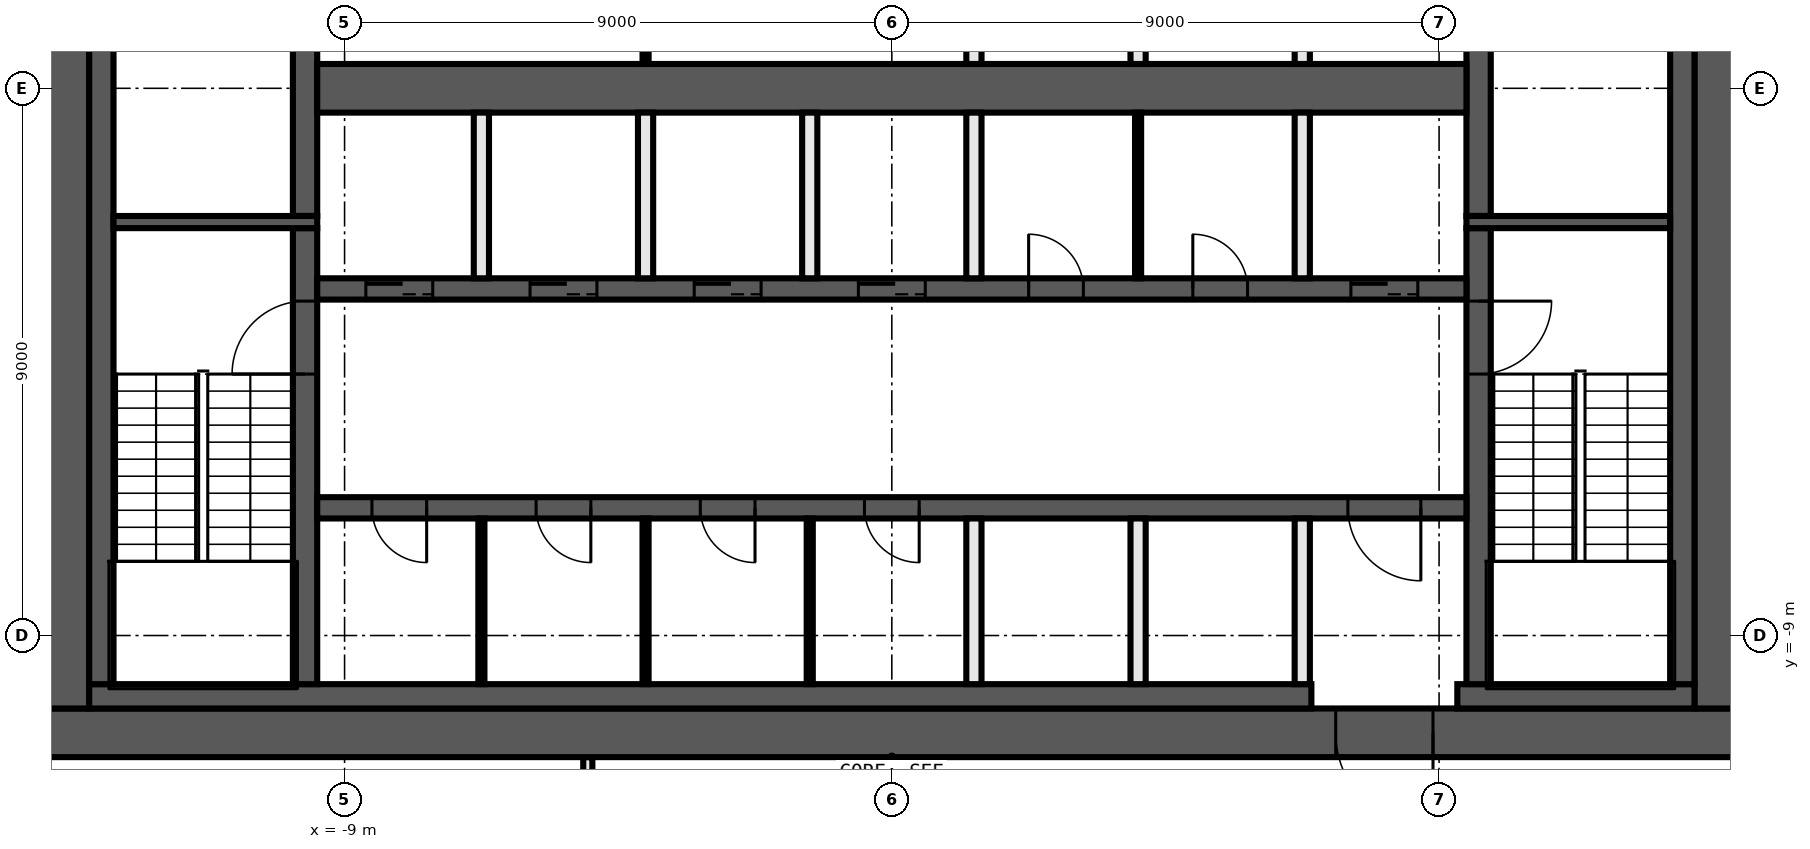
"""IFC4 building model, lengths in metres.
Left out: names, types, materials, properties, quantities, classifications, styles, units other than length and angle.
Written with IfcOpenShell. Run it as: python <this file> out.ifc"""

import sys

from ifc_helpers import new_model, si_unit, direction, frame, frame_2d, origin, place, context, subcontext, project, spatial, rectangle, extrude, element, fill, save


model = new_model("IFC4")
c1 = context("Model", 3, precision=1e-05, world=origin(), true_north=direction((0.0, 1.0)))
c2 = subcontext(c1, "Body", "Model", "MODEL_VIEW")
j1 = project(units=[si_unit("LENGTHUNIT", "METRE"), si_unit("PLANEANGLEUNIT", "RADIAN")], contexts=[c1])
p1 = place(None, origin())
s1 = spatial("IfcSite", under=j1, at=p1, CompositionType="ELEMENT")
p2 = place(p1, origin())
s2 = spatial("IfcBuilding", under=s1, at=p2, CompositionType="ELEMENT")
p3 = place(p2, frame((0.0, 0.0, 198.8)))
s3 = spatial("IfcBuildingStorey", under=s2, at=p3, CompositionType="ELEMENT", Elevation=198.8)
p4 = place(p3, frame((-5.0, -14.125, 0.0), z_axis=(0.0, 0.0, 1.0), x_axis=(0.0, 1.0, 0.0)))
e1 = element("IfcWall", 1, at=p4, inside=s3, PredefinedType="PARTITIONING", context=c2, shape_type="SweptSolid", body=[
    extrude(rectangle(XDim=3.125, YDim=0.15, at=frame_2d((1.562, 0.0))), origin(), (0.0, 0.0, 1.0), 3.82),
])
p5 = place(p3, frame((14.0, -10.6, 0.0), z_axis=(0.0, 0.0, 1.0), x_axis=(-1.0, 0.0, 0.0)))
e2 = element("IfcWall", 2, at=p5, inside=s3, PredefinedType="SHEAR", context=c2, shape_type="SweptSolid", body=[
    extrude(rectangle(XDim=28.0, YDim=0.8, at=frame_2d((14.0, 0.0))), origin(), (0.0, 0.0, 1.0), 3.82),
])
p6 = place(p5, frame((5.1, 0.0, 0.0)))
e3 = element("IfcOpeningElement", 3, at=p6, cuts=e2, PredefinedType="OPENING", context=c2, shape_type="SweptSolid", body=[
    extrude(rectangle(XDim=1.6, YDim=2.1, at=frame_2d((0.8, 1.05))), frame((0.0, 0.41, 0.0), z_axis=(0.0, -1.0, 0.0), x_axis=(1.0, 0.0, 0.0)), (0.0, 0.0, 1.0), 0.82),
])
for number, where, z_axis, x_axis in (
    (4, (13.6, 10.2, 0.0), (0.0, 0.0, 1.0), (0.0, -1.0, 0.0)),
    (5, (-13.6, -10.2, 0.0), (0.0, 0.0, 1.0), (0.0, 1.0, 0.0)),
):
    element("IfcWall", number, at=place(p3, frame(where, z_axis=z_axis, x_axis=x_axis)), inside=s3, PredefinedType="SHEAR", context=c2, shape_type="SweptSolid", body=[
        extrude(rectangle(XDim=20.4, YDim=0.8, at=frame_2d((10.2, 0.0))), origin(), (0.0, 0.0, 1.0), 3.82),
    ])
p7 = place(p3, frame((13.2, -10.0, 0.0), z_axis=(0.0, 0.0, 1.0), x_axis=(-1.0, 0.0, 0.0)))
e6 = element("IfcWall", 6, at=p7, inside=s3, PredefinedType="SHEAR", context=c2, shape_type="SweptSolid", body=[
    extrude(rectangle(XDim=3.9, YDim=0.4, at=frame_2d((1.95, 0.0))), origin(), (0.0, 0.0, 1.0), 3.82),
])
p8 = place(p3, frame((6.9, -10.0, 0.0), z_axis=(0.0, 0.0, 1.0), x_axis=(-1.0, 0.0, 0.0)))
e7 = element("IfcWall", 7, at=p8, inside=s3, PredefinedType="SHEAR", context=c2, shape_type="SweptSolid", body=[
    extrude(rectangle(XDim=20.1, YDim=0.4, at=frame_2d((10.05, 0.0))), origin(), (0.0, 0.0, 1.0), 3.82),
])
for number, where, z_axis, x_axis in (
    (8, (13.0, 9.8, 0.0), (0.0, 0.0, 1.0), (0.0, -1.0, 0.0)),
    (9, (-13.0, -9.8, 0.0), (0.0, 0.0, 1.0), (0.0, 1.0, 0.0)),
):
    element("IfcWall", number, at=place(p3, frame(where, z_axis=z_axis, x_axis=x_axis)), inside=s3, PredefinedType="SHEAR", context=c2, shape_type="SweptSolid", body=[
        extrude(rectangle(XDim=19.6, YDim=0.4, at=frame_2d((9.8, 0.0))), origin(), (0.0, 0.0, 1.0), 3.82),
    ])
p9 = place(p3, frame((9.65, -2.3, 0.0), z_axis=(0.0, 0.0, 1.0), x_axis=(0.0, -1.0, 0.0)))
e10 = element("IfcWall", 10, at=p9, inside=s3, PredefinedType="SHEAR", context=c2, shape_type="SweptSolid", body=[
    extrude(rectangle(XDim=7.5, YDim=0.4, at=frame_2d((3.75, 0.0))), origin(), (0.0, 0.0, 1.0), 3.82),
])
p10 = place(p9, frame((1.2, 0.0, 0.0)))
e11 = element("IfcOpeningElement", 11, at=p10, cuts=e10, PredefinedType="OPENING", context=c2, shape_type="SweptSolid", body=[
    extrude(rectangle(XDim=1.2, YDim=2.1, at=frame_2d((0.6, 1.05))), frame((0.0, 0.21, 0.0), z_axis=(0.0, -1.0, 0.0), x_axis=(1.0, 0.0, 0.0)), (0.0, 0.0, 1.0), 0.42),
])
p11 = place(p3, frame((9.65, 2.1, 0.0), z_axis=(0.0, 0.0, 1.0), x_axis=(0.0, -1.0, 0.0)))
e12 = element("IfcWall", 12, at=p11, inside=s3, PredefinedType="SHEAR", context=c2, shape_type="SweptSolid", body=[
    extrude(rectangle(XDim=4.2, YDim=0.4, at=frame_2d((2.1, 0.0))), origin(), (0.0, 0.0, 1.0), 3.82),
])
p12 = place(p11, frame((0.15, 0.0, 0.0)))
e13 = element("IfcOpeningElement", 13, at=p12, cuts=e12, PredefinedType="OPENING", context=c2, shape_type="SweptSolid", body=[
    extrude(rectangle(XDim=0.9, YDim=2.1, at=frame_2d((0.45, 1.05))), frame((0.0, 0.21, 0.0), z_axis=(0.0, -1.0, 0.0), x_axis=(1.0, 0.0, 0.0)), (0.0, 0.0, 1.0), 0.42),
])
p13 = place(p3, frame((-9.65, -9.8, 0.0), z_axis=(0.0, 0.0, 1.0), x_axis=(0.0, 1.0, 0.0)))
e14 = element("IfcWall", 14, at=p13, inside=s3, PredefinedType="SHEAR", context=c2, shape_type="SweptSolid", body=[
    extrude(rectangle(XDim=7.5, YDim=0.4, at=frame_2d((3.75, 0.0))), origin(), (0.0, 0.0, 1.0), 3.82),
])
p14 = place(p13, frame((5.1, 0.0, 0.0)))
e15 = element("IfcOpeningElement", 15, at=p14, cuts=e14, PredefinedType="OPENING", context=c2, shape_type="SweptSolid", body=[
    extrude(rectangle(XDim=1.2, YDim=2.1, at=frame_2d((0.6, 1.05))), frame((0.0, 0.21, 0.0), z_axis=(0.0, -1.0, 0.0), x_axis=(1.0, 0.0, 0.0)), (0.0, 0.0, 1.0), 0.42),
])
p15 = place(p3, frame((-9.65, -2.1, 0.0), z_axis=(0.0, 0.0, 1.0), x_axis=(0.0, 1.0, 0.0)))
e16 = element("IfcWall", 16, at=p15, inside=s3, PredefinedType="SHEAR", context=c2, shape_type="SweptSolid", body=[
    extrude(rectangle(XDim=4.2, YDim=0.4, at=frame_2d((2.1, 0.0))), origin(), (0.0, 0.0, 1.0), 3.82),
])
for number, where, z_axis, x_axis in (
    (17, (9.45, -2.2, 0.0), (0.0, 0.0, 1.0), (1.0, 0.0, 0.0)),
    (18, (-9.45, -2.2, 0.0), (0.0, 0.0, 1.0), (-1.0, 0.0, 0.0)),
):
    element("IfcWall", number, at=place(p3, frame(where, z_axis=z_axis, x_axis=x_axis)), inside=s3, PredefinedType="SHEAR", context=c2, shape_type="SweptSolid", body=[
        extrude(rectangle(XDim=3.35, YDim=0.2, at=frame_2d((1.675, 0.0))), origin(), (0.0, 0.0, 1.0), 3.82),
    ])
p16 = place(p3, frame((-9.45, -3.3, 0.0), z_axis=(0.0, 0.0, 1.0), x_axis=(1.0, 0.0, 0.0)))
e19 = element("IfcWall", 19, at=p16, inside=s3, PredefinedType="SHEAR", context=c2, shape_type="SweptSolid", body=[
    extrude(rectangle(XDim=18.9, YDim=0.35, at=frame_2d((9.45, 0.0))), origin(), (0.0, 0.0, 1.0), 3.82),
])
p17 = place(p16, frame((0.8, 0.0, 0.0)))
e20 = element("IfcOpeningElement", 20, at=p17, cuts=e19, PredefinedType="OPENING", context=c2, shape_type="SweptSolid", body=[
    extrude(rectangle(XDim=1.1, YDim=2.1, at=frame_2d((0.55, 1.05))), frame((0.0, 0.185, 0.0), z_axis=(0.0, -1.0, 0.0), x_axis=(1.0, 0.0, 0.0)), (0.0, 0.0, 1.0), 0.37),
])
p18 = place(p16, frame((3.5, 0.0, 0.0)))
e21 = element("IfcOpeningElement", 21, at=p18, cuts=e19, PredefinedType="OPENING", context=c2, shape_type="SweptSolid", body=[
    extrude(rectangle(XDim=1.1, YDim=2.1, at=frame_2d((0.55, 1.05))), frame((0.0, 0.185, 0.0), z_axis=(0.0, -1.0, 0.0), x_axis=(1.0, 0.0, 0.0)), (0.0, 0.0, 1.0), 0.37),
])
p19 = place(p16, frame((6.2, 0.0, 0.0)))
e22 = element("IfcOpeningElement", 22, at=p19, cuts=e19, PredefinedType="OPENING", context=c2, shape_type="SweptSolid", body=[
    extrude(rectangle(XDim=1.1, YDim=2.1, at=frame_2d((0.55, 1.05))), frame((0.0, 0.185, 0.0), z_axis=(0.0, -1.0, 0.0), x_axis=(1.0, 0.0, 0.0)), (0.0, 0.0, 1.0), 0.37),
])
p20 = place(p16, frame((8.9, 0.0, 0.0)))
e23 = element("IfcOpeningElement", 23, at=p20, cuts=e19, PredefinedType="OPENING", context=c2, shape_type="SweptSolid", body=[
    extrude(rectangle(XDim=1.1, YDim=2.1, at=frame_2d((0.55, 1.05))), frame((0.0, 0.185, 0.0), z_axis=(0.0, -1.0, 0.0), x_axis=(1.0, 0.0, 0.0)), (0.0, 0.0, 1.0), 0.37),
])
p21 = place(p16, frame((17.0, 0.0, 0.0)))
e24 = element("IfcOpeningElement", 24, at=p21, cuts=e19, PredefinedType="OPENING", context=c2, shape_type="SweptSolid", body=[
    extrude(rectangle(XDim=1.1, YDim=2.1, at=frame_2d((0.55, 1.05))), frame((0.0, 0.185, 0.0), z_axis=(0.0, -1.0, 0.0), x_axis=(1.0, 0.0, 0.0)), (0.0, 0.0, 1.0), 0.37),
])
p22 = place(p16, frame((11.7, 0.0, 0.0)))
e25 = element("IfcOpeningElement", 25, at=p22, cuts=e19, PredefinedType="OPENING", context=c2, shape_type="SweptSolid", body=[
    extrude(rectangle(XDim=0.9, YDim=2.1, at=frame_2d((0.45, 1.05))), frame((0.0, 0.185, 0.0), z_axis=(0.0, -1.0, 0.0), x_axis=(1.0, 0.0, 0.0)), (0.0, 0.0, 1.0), 0.37),
])
p23 = place(p16, frame((14.4, 0.0, 0.0)))
e26 = element("IfcOpeningElement", 26, at=p23, cuts=e19, PredefinedType="OPENING", context=c2, shape_type="SweptSolid", body=[
    extrude(rectangle(XDim=0.9, YDim=2.1, at=frame_2d((0.45, 1.05))), frame((0.0, 0.185, 0.0), z_axis=(0.0, -1.0, 0.0), x_axis=(1.0, 0.0, 0.0)), (0.0, 0.0, 1.0), 0.37),
])
p24 = place(p3, frame((9.45, -6.9, 0.0), z_axis=(0.0, 0.0, 1.0), x_axis=(-1.0, 0.0, 0.0)))
e27 = element("IfcWall", 27, at=p24, inside=s3, PredefinedType="SHEAR", context=c2, shape_type="SweptSolid", body=[
    extrude(rectangle(XDim=18.9, YDim=0.35, at=frame_2d((9.45, 0.0))), origin(), (0.0, 0.0, 1.0), 3.82),
])
p25 = place(p24, frame((0.75, 0.0, 0.0)))
e28 = element("IfcOpeningElement", 28, at=p25, cuts=e27, PredefinedType="OPENING", context=c2, shape_type="SweptSolid", body=[
    extrude(rectangle(XDim=1.2, YDim=2.1, at=frame_2d((0.6, 1.05))), frame((0.0, 0.185, 0.0), z_axis=(0.0, -1.0, 0.0), x_axis=(1.0, 0.0, 0.0)), (0.0, 0.0, 1.0), 0.37),
])
p26 = place(p24, frame((17.1, 0.0, 0.0)))
e29 = element("IfcOpeningElement", 29, at=p26, cuts=e27, PredefinedType="OPENING", context=c2, shape_type="SweptSolid", body=[
    extrude(rectangle(XDim=0.9, YDim=2.1, at=frame_2d((0.45, 1.05))), frame((0.0, 0.185, 0.0), z_axis=(0.0, -1.0, 0.0), x_axis=(1.0, 0.0, 0.0)), (0.0, 0.0, 1.0), 0.37),
])
p27 = place(p24, frame((14.4, 0.0, 0.0)))
e30 = element("IfcOpeningElement", 30, at=p27, cuts=e27, PredefinedType="OPENING", context=c2, shape_type="SweptSolid", body=[
    extrude(rectangle(XDim=0.9, YDim=2.1, at=frame_2d((0.45, 1.05))), frame((0.0, 0.185, 0.0), z_axis=(0.0, -1.0, 0.0), x_axis=(1.0, 0.0, 0.0)), (0.0, 0.0, 1.0), 0.37),
])
p28 = place(p24, frame((11.7, 0.0, 0.0)))
e31 = element("IfcOpeningElement", 31, at=p28, cuts=e27, PredefinedType="OPENING", context=c2, shape_type="SweptSolid", body=[
    extrude(rectangle(XDim=0.9, YDim=2.1, at=frame_2d((0.45, 1.05))), frame((0.0, 0.185, 0.0), z_axis=(0.0, -1.0, 0.0), x_axis=(1.0, 0.0, 0.0)), (0.0, 0.0, 1.0), 0.37),
])
p29 = place(p24, frame((9.0, 0.0, 0.0)))
e32 = element("IfcOpeningElement", 32, at=p29, cuts=e27, PredefinedType="OPENING", context=c2, shape_type="SweptSolid", body=[
    extrude(rectangle(XDim=0.9, YDim=2.1, at=frame_2d((0.45, 1.05))), frame((0.0, 0.185, 0.0), z_axis=(0.0, -1.0, 0.0), x_axis=(1.0, 0.0, 0.0)), (0.0, 0.0, 1.0), 0.37),
])
p30 = place(p3, frame((-9.45, 0.0, 0.0), z_axis=(0.0, 0.0, 1.0), x_axis=(1.0, 0.0, 0.0)))
e33 = element("IfcWall", 33, at=p30, inside=s3, PredefinedType="SHEAR", context=c2, shape_type="SweptSolid", body=[
    extrude(rectangle(XDim=18.9, YDim=0.8, at=frame_2d((9.45, 0.0))), origin(), (0.0, 0.0, 1.0), 3.82),
])
for number, where, z_axis, x_axis in (
    (34, (6.75, -9.8, 0.0), (0.0, 0.0, 1.0), (0.0, 1.0, 0.0)),
    (35, (6.75, -3.125, 0.0), (0.0, 0.0, 1.0), (0.0, 1.0, 0.0)),
    (36, (6.75, 0.4, 0.0), (0.0, 0.0, 1.0), (0.0, 1.0, 0.0)),
):
    element("IfcWall", number, at=place(p3, frame(where, z_axis=z_axis, x_axis=x_axis)), inside=s3, PredefinedType="SOLIDWALL", context=c2, shape_type="SweptSolid", body=[
        extrude(rectangle(XDim=2.725, YDim=0.25, at=frame_2d((1.363, 0.0))), origin(), (0.0, 0.0, 1.0), 3.82),
    ])
p31 = place(p3, frame((4.05, -3.125, 0.0), z_axis=(0.0, 0.0, 1.0), x_axis=(0.0, 1.0, 0.0)))
e37 = element("IfcWall", 37, at=p31, inside=s3, PredefinedType="PARTITIONING", context=c2, shape_type="SweptSolid", body=[
    extrude(rectangle(XDim=2.725, YDim=0.1, at=frame_2d((1.363, 0.0))), origin(), (0.0, 0.0, 1.0), 3.82),
])
for number, where, z_axis, x_axis in (
    (38, (4.05, -9.8, 0.0), (0.0, 0.0, 1.0), (0.0, 1.0, 0.0)),
    (39, (4.05, 0.4, 0.0), (0.0, 0.0, 1.0), (0.0, 1.0, 0.0)),
    (40, (1.35, -9.8, 0.0), (0.0, 0.0, 1.0), (0.0, 1.0, 0.0)),
    (41, (1.35, -3.125, 0.0), (0.0, 0.0, 1.0), (0.0, 1.0, 0.0)),
    (42, (1.35, 0.4, 0.0), (0.0, 0.0, 1.0), (0.0, 1.0, 0.0)),
):
    element("IfcWall", number, at=place(p3, frame(where, z_axis=z_axis, x_axis=x_axis)), inside=s3, PredefinedType="SOLIDWALL", context=c2, shape_type="SweptSolid", body=[
        extrude(rectangle(XDim=2.725, YDim=0.25, at=frame_2d((1.363, 0.0))), origin(), (0.0, 0.0, 1.0), 3.82),
    ])
p32 = place(p3, frame((-1.35, -9.8, 0.0), z_axis=(0.0, 0.0, 1.0), x_axis=(0.0, 1.0, 0.0)))
e43 = element("IfcWall", 43, at=p32, inside=s3, PredefinedType="PARTITIONING", context=c2, shape_type="SweptSolid", body=[
    extrude(rectangle(XDim=2.725, YDim=0.1, at=frame_2d((1.363, 0.0))), origin(), (0.0, 0.0, 1.0), 3.82),
])
p33 = place(p3, frame((-1.35, -3.125, 0.0), z_axis=(0.0, 0.0, 1.0), x_axis=(0.0, 1.0, 0.0)))
e44 = element("IfcWall", 44, at=p33, inside=s3, PredefinedType="SOLIDWALL", context=c2, shape_type="SweptSolid", body=[
    extrude(rectangle(XDim=2.725, YDim=0.25, at=frame_2d((1.363, 0.0))), origin(), (0.0, 0.0, 1.0), 3.82),
])
for number, where, z_axis, x_axis in (
    (45, (-4.05, -9.8, 0.0), (0.0, 0.0, 1.0), (0.0, 1.0, 0.0)),
    (46, (-4.05, 0.4, 0.0), (0.0, 0.0, 1.0), (0.0, 1.0, 0.0)),
):
    element("IfcWall", number, at=place(p3, frame(where, z_axis=z_axis, x_axis=x_axis)), inside=s3, PredefinedType="PARTITIONING", context=c2, shape_type="SweptSolid", body=[
        extrude(rectangle(XDim=2.725, YDim=0.1, at=frame_2d((1.363, 0.0))), origin(), (0.0, 0.0, 1.0), 3.82),
    ])
p34 = place(p3, frame((-4.05, -3.125, 0.0), z_axis=(0.0, 0.0, 1.0), x_axis=(0.0, 1.0, 0.0)))
e47 = element("IfcWall", 47, at=p34, inside=s3, PredefinedType="SOLIDWALL", context=c2, shape_type="SweptSolid", body=[
    extrude(rectangle(XDim=2.725, YDim=0.25, at=frame_2d((1.363, 0.0))), origin(), (0.0, 0.0, 1.0), 3.82),
])
p35 = place(p3, frame((-6.75, -9.8, 0.0), z_axis=(0.0, 0.0, 1.0), x_axis=(0.0, 1.0, 0.0)))
e48 = element("IfcWall", 48, at=p35, inside=s3, PredefinedType="PARTITIONING", context=c2, shape_type="SweptSolid", body=[
    extrude(rectangle(XDim=2.725, YDim=0.1, at=frame_2d((1.363, 0.0))), origin(), (0.0, 0.0, 1.0), 3.82),
])
p36 = place(p3, frame((-6.75, -3.125, 0.0), z_axis=(0.0, 0.0, 1.0), x_axis=(0.0, 1.0, 0.0)))
e49 = element("IfcWall", 49, at=p36, inside=s3, PredefinedType="SOLIDWALL", context=c2, shape_type="SweptSolid", body=[
    extrude(rectangle(XDim=2.725, YDim=0.25, at=frame_2d((1.363, 0.0))), origin(), (0.0, 0.0, 1.0), 3.82),
])
p37 = place(p17, origin())
e50 = element("IfcDoor", 50, at=p37, inside=s3, OperationType="DOUBLE_DOOR_SLIDING", PredefinedType="DOOR", context=c2, shape_type="SweptSolid", body=[
    extrude(rectangle(XDim=1.1, YDim=2.1, at=frame_2d((0.55, 1.05))), frame((0.0, 0.025, 0.0), z_axis=(0.0, -1.0, 0.0), x_axis=(1.0, 0.0, 0.0)), (0.0, 0.0, 1.0), 0.05),
])
fill(e20, e50)
p38 = place(p18, origin())
e51 = element("IfcDoor", 51, at=p38, inside=s3, OperationType="DOUBLE_DOOR_SLIDING", PredefinedType="DOOR", context=c2, shape_type="SweptSolid", body=[
    extrude(rectangle(XDim=1.1, YDim=2.1, at=frame_2d((0.55, 1.05))), frame((0.0, 0.025, 0.0), z_axis=(0.0, -1.0, 0.0), x_axis=(1.0, 0.0, 0.0)), (0.0, 0.0, 1.0), 0.05),
])
fill(e21, e51)
p39 = place(p19, origin())
e52 = element("IfcDoor", 52, at=p39, inside=s3, OperationType="DOUBLE_DOOR_SLIDING", PredefinedType="DOOR", context=c2, shape_type="SweptSolid", body=[
    extrude(rectangle(XDim=1.1, YDim=2.1, at=frame_2d((0.55, 1.05))), frame((0.0, 0.025, 0.0), z_axis=(0.0, -1.0, 0.0), x_axis=(1.0, 0.0, 0.0)), (0.0, 0.0, 1.0), 0.05),
])
fill(e22, e52)
p40 = place(p20, origin())
e53 = element("IfcDoor", 53, at=p40, inside=s3, OperationType="DOUBLE_DOOR_SLIDING", PredefinedType="DOOR", context=c2, shape_type="SweptSolid", body=[
    extrude(rectangle(XDim=1.1, YDim=2.1, at=frame_2d((0.55, 1.05))), frame((0.0, 0.025, 0.0), z_axis=(0.0, -1.0, 0.0), x_axis=(1.0, 0.0, 0.0)), (0.0, 0.0, 1.0), 0.05),
])
fill(e23, e53)
p41 = place(p21, origin())
e54 = element("IfcDoor", 54, at=p41, inside=s3, OperationType="DOUBLE_DOOR_SLIDING", PredefinedType="DOOR", context=c2, shape_type="SweptSolid", body=[
    extrude(rectangle(XDim=1.1, YDim=2.1, at=frame_2d((0.55, 1.05))), frame((0.0, 0.025, 0.0), z_axis=(0.0, -1.0, 0.0), x_axis=(1.0, 0.0, 0.0)), (0.0, 0.0, 1.0), 0.05),
])
fill(e24, e54)
p42 = place(p6, origin())
e55 = element("IfcDoor", 55, at=p42, inside=s3, OperationType="DOUBLE_DOOR_SINGLE_SWING", PredefinedType="DOOR", context=c2, shape_type="SweptSolid", body=[
    extrude(rectangle(XDim=1.6, YDim=2.1, at=frame_2d((0.8, 1.05))), frame((0.0, 0.025, 0.0), z_axis=(0.0, -1.0, 0.0), x_axis=(1.0, 0.0, 0.0)), (0.0, 0.0, 1.0), 0.05),
])
fill(e3, e55)
p43 = place(p25, origin())
e56 = element("IfcDoor", 56, at=p43, inside=s3, OperationType="SINGLE_SWING_LEFT", PredefinedType="DOOR", context=c2, shape_type="SweptSolid", body=[
    extrude(rectangle(XDim=1.2, YDim=2.1, at=frame_2d((0.6, 1.05))), frame((0.0, 0.025, 0.0), z_axis=(0.0, -1.0, 0.0), x_axis=(1.0, 0.0, 0.0)), (0.0, 0.0, 1.0), 0.05),
])
fill(e28, e56)
p44 = place(p22, origin())
e57 = element("IfcDoor", 57, at=p44, inside=s3, OperationType="SINGLE_SWING_LEFT", PredefinedType="DOOR", context=c2, shape_type="SweptSolid", body=[
    extrude(rectangle(XDim=0.9, YDim=2.1, at=frame_2d((0.45, 1.05))), frame((0.0, 0.025, 0.0), z_axis=(0.0, -1.0, 0.0), x_axis=(1.0, 0.0, 0.0)), (0.0, 0.0, 1.0), 0.05),
])
fill(e25, e57)
p45 = place(p23, origin())
e58 = element("IfcDoor", 58, at=p45, inside=s3, OperationType="SINGLE_SWING_RIGHT", PredefinedType="DOOR", context=c2, shape_type="SweptSolid", body=[
    extrude(rectangle(XDim=0.9, YDim=2.1, at=frame_2d((0.45, 1.05))), frame((0.0, 0.025, 0.0), z_axis=(0.0, -1.0, 0.0), x_axis=(1.0, 0.0, 0.0)), (0.0, 0.0, 1.0), 0.05),
])
fill(e26, e58)
p46 = place(p26, origin())
e59 = element("IfcDoor", 59, at=p46, inside=s3, OperationType="SINGLE_SWING_LEFT", PredefinedType="DOOR", context=c2, shape_type="SweptSolid", body=[
    extrude(rectangle(XDim=0.9, YDim=2.1, at=frame_2d((0.45, 1.05))), frame((0.0, 0.025, 0.0), z_axis=(0.0, -1.0, 0.0), x_axis=(1.0, 0.0, 0.0)), (0.0, 0.0, 1.0), 0.05),
])
fill(e29, e59)
p47 = place(p27, origin())
e60 = element("IfcDoor", 60, at=p47, inside=s3, OperationType="SINGLE_SWING_RIGHT", PredefinedType="DOOR", context=c2, shape_type="SweptSolid", body=[
    extrude(rectangle(XDim=0.9, YDim=2.1, at=frame_2d((0.45, 1.05))), frame((0.0, 0.025, 0.0), z_axis=(0.0, -1.0, 0.0), x_axis=(1.0, 0.0, 0.0)), (0.0, 0.0, 1.0), 0.05),
])
fill(e30, e60)
p48 = place(p28, origin())
e61 = element("IfcDoor", 61, at=p48, inside=s3, OperationType="SINGLE_SWING_LEFT", PredefinedType="DOOR", context=c2, shape_type="SweptSolid", body=[
    extrude(rectangle(XDim=0.9, YDim=2.1, at=frame_2d((0.45, 1.05))), frame((0.0, 0.025, 0.0), z_axis=(0.0, -1.0, 0.0), x_axis=(1.0, 0.0, 0.0)), (0.0, 0.0, 1.0), 0.05),
])
fill(e31, e61)
p49 = place(p29, origin())
e62 = element("IfcDoor", 62, at=p49, inside=s3, OperationType="SINGLE_SWING_RIGHT", PredefinedType="DOOR", context=c2, shape_type="SweptSolid", body=[
    extrude(rectangle(XDim=0.9, YDim=2.1, at=frame_2d((0.45, 1.05))), frame((0.0, 0.025, 0.0), z_axis=(0.0, -1.0, 0.0), x_axis=(1.0, 0.0, 0.0)), (0.0, 0.0, 1.0), 0.05),
])
fill(e32, e62)
p50 = place(p10, origin())
e63 = element("IfcDoor", 63, at=p50, inside=s3, OperationType="SINGLE_SWING_RIGHT", PredefinedType="DOOR", context=c2, shape_type="SweptSolid", body=[
    extrude(rectangle(XDim=1.2, YDim=2.1, at=frame_2d((0.6, 1.05))), frame((0.0, 0.025, 0.0), z_axis=(0.0, -1.0, 0.0), x_axis=(1.0, 0.0, 0.0)), (0.0, 0.0, 1.0), 0.05),
])
fill(e11, e63)
p51 = place(p14, origin())
e64 = element("IfcDoor", 64, at=p51, inside=s3, OperationType="SINGLE_SWING_LEFT", PredefinedType="DOOR", context=c2, shape_type="SweptSolid", body=[
    extrude(rectangle(XDim=1.2, YDim=2.1, at=frame_2d((0.6, 1.05))), frame((0.0, 0.025, 0.0), z_axis=(0.0, -1.0, 0.0), x_axis=(1.0, 0.0, 0.0)), (0.0, 0.0, 1.0), 0.05),
])
fill(e15, e64)
save(model, sys.argv[1])
